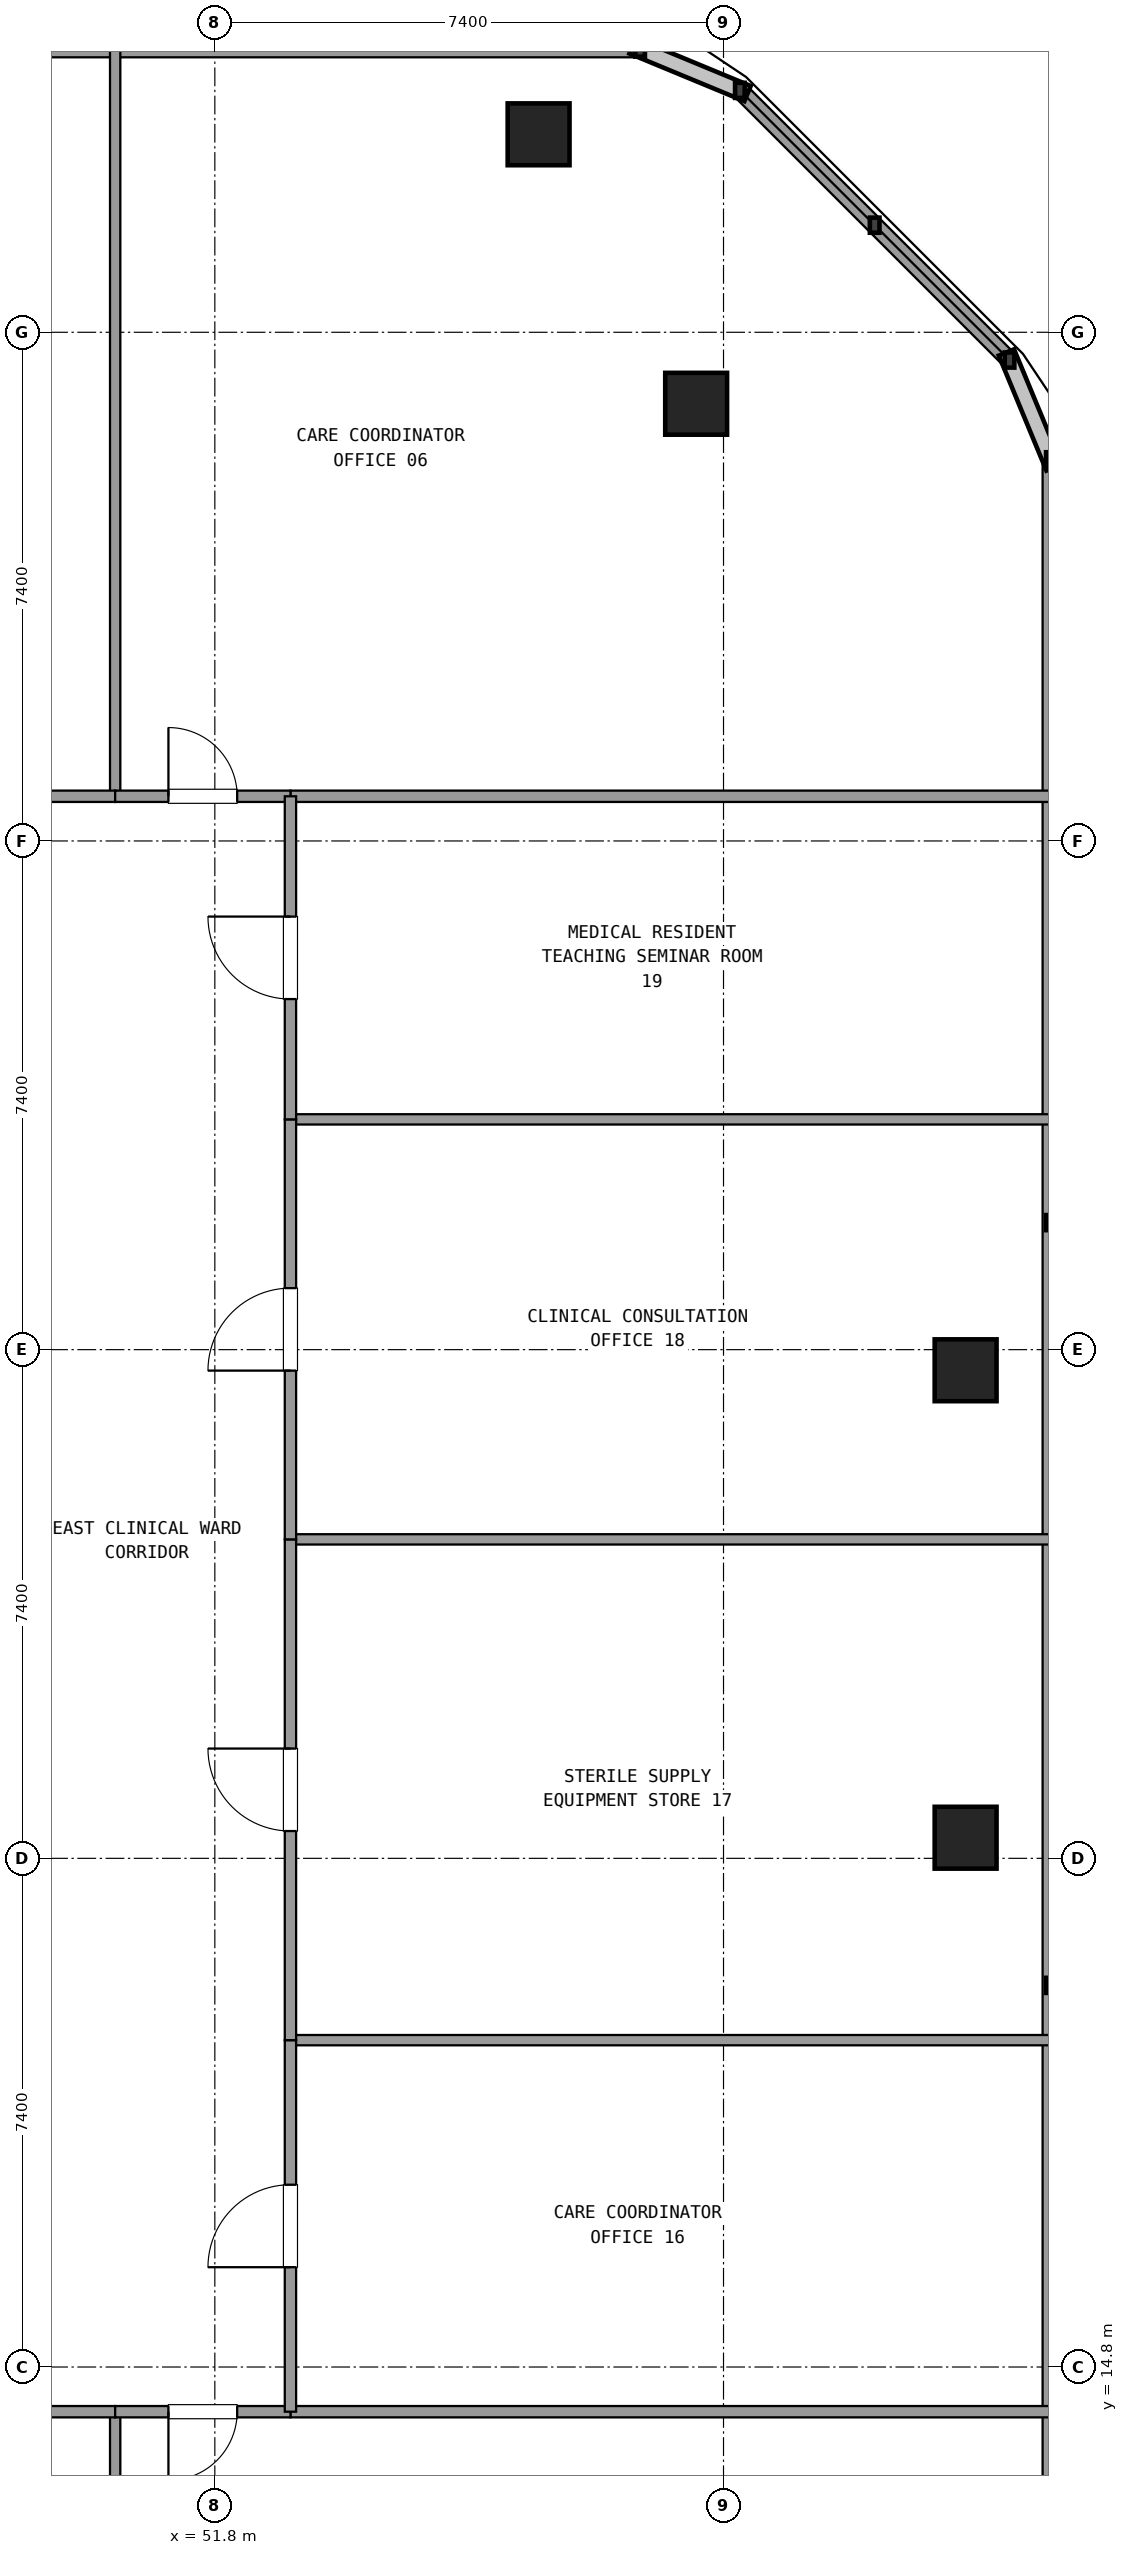
"""IFC4 building model, lengths in metres.
Left out: names, types, materials, properties, quantities, classifications, styles, units other than length and angle.
Written with IfcOpenShell. Run it as: python <this file> out.ifc"""

import sys

from ifc_helpers import new_model, si_unit, direction, frame, frame_2d, origin, origin_2d, place, context, subcontext, project, spatial, rectangle, extrude, element, fill, save


model = new_model("IFC4")
c1 = context("Model", 3, precision=1e-05, world=origin(), true_north=direction((0.0, 1.0)))
c2 = subcontext(c1, "Body", "Model", "MODEL_VIEW")
j1 = project(units=[si_unit("LENGTHUNIT", "METRE"), si_unit("PLANEANGLEUNIT", "RADIAN")], contexts=[c1])
p1 = place(None, origin())
s1 = spatial("IfcSite", under=j1, at=p1, CompositionType="ELEMENT")
p2 = place(p1, origin())
s2 = spatial("IfcBuilding", under=s1, at=p2, CompositionType="ELEMENT")
p3 = place(p2, frame((0.0, 0.0, 228.78)))
s3 = spatial("IfcBuildingStorey", under=s2, at=p3, CompositionType="ELEMENT", Elevation=228.78)
for number, where, z_axis, x_axis in (
    (1, (62.722, 22.5, 0.0), (0.0, 0.0, 1.0), (1.0, 0.0, 0.0)),
    (2, (62.722, 29.3, 0.0), (0.0, 0.0, 1.0), (1.0, 0.0, 0.0)),
    (3, (58.802, 43.36, 0.0), (0.0, 0.0, 1.0), (1.0, 0.0, 0.0)),
    (4, (56.51, 47.28, 0.0), (0.0, 0.0, 1.0), (1.0, 0.0, 0.0)),
):
    element("IfcColumn", number, at=place(p3, frame(where, z_axis=z_axis, x_axis=x_axis)), inside=s3, PredefinedType="COLUMN", context=c2, shape_type="SweptSolid", body=[
        extrude(rectangle(XDim=0.9, YDim=0.9, at=origin_2d()), origin(), (0.0, 0.0, 1.0), 3.6),
    ])
p4 = place(p3, frame((63.962, 9.255, 0.0), z_axis=(0.0, 0.0, 1.0), x_axis=(0.0, 1.0, 0.0)))
e5 = element("IfcWall", 5, at=p4, inside=s3, PredefinedType="SOLIDWALL", context=c2, shape_type="SweptSolid", body=[
    extrude(rectangle(XDim=33.29, YDim=0.24, at=frame_2d((16.645, 0.0))), origin(), (0.0, 0.0, 1.0), 0.85),
])
p5 = place(p3, frame((63.361, 43.996, 0.0), z_axis=(0.0, 0.0, 1.0), x_axis=(-0.707128783731, 0.707084777957, 0.0)))
e6 = element("IfcWall", 6, at=p5, inside=s3, PredefinedType="SOLIDWALL", context=c2, shape_type="SweptSolid", body=[
    extrude(rectangle(XDim=5.548, YDim=0.24, at=frame_2d((2.774, 0.0))), origin(), (0.0, 0.0, 1.0), 0.85),
])
p6 = place(p3, frame((57.987, 48.52, 0.0), z_axis=(0.0, 0.0, 1.0), x_axis=(-1.0, 0.0, 0.0)))
e7 = element("IfcWall", 7, at=p6, inside=s3, PredefinedType="SOLIDWALL", context=c2, shape_type="SweptSolid", body=[
    extrude(rectangle(XDim=41.974, YDim=0.24, at=frame_2d((20.987, 0.0))), origin(), (0.0, 0.0, 1.0), 0.85),
])
for number, where, z_axis, x_axis in (
    (8, (52.9, 37.65, 0.0), (0.0, 0.0, 1.0), (1.0, 0.0, 0.0)),
    (9, (52.9, 14.15, 0.0), (0.0, 0.0, 1.0), (1.0, 0.0, 0.0)),
):
    element("IfcWall", number, at=place(p3, frame(where, z_axis=z_axis, x_axis=x_axis)), inside=s3, PredefinedType="PARTITIONING", context=c2, shape_type="SweptSolid", body=[
        extrude(rectangle(XDim=11.042, YDim=0.165, at=frame_2d((5.521, 0.0))), origin(), (0.0, 0.0, 1.0), 2.59),
    ])
p7 = place(p3, frame((50.35, 37.65, 0.0), z_axis=(0.0, 0.0, 1.0), x_axis=(0.0, 1.0, 0.0)))
e10 = element("IfcWall", 10, at=p7, inside=s3, PredefinedType="PARTITIONING", context=c2, shape_type="SweptSolid", body=[
    extrude(rectangle(XDim=10.85, YDim=0.15, at=frame_2d((5.425, 0.0))), origin(), (0.0, 0.0, 1.0), 2.59),
])
p8 = place(p3, frame((43.221, 37.65, 0.0), z_axis=(0.0, 0.0, 1.0), x_axis=(1.0, 0.0, 0.0)))
e11 = element("IfcWall", 11, at=p8, inside=s3, PredefinedType="PARTITIONING", context=c2, shape_type="SweptSolid", body=[
    extrude(rectangle(XDim=7.129, YDim=0.165, at=frame_2d((3.564, 0.0))), origin(), (0.0, 0.0, 1.0), 2.59),
])
p9 = place(p8, frame((2.965, 0.0, 0.0)))
e12 = element("IfcOpeningElement", 12, at=p9, cuts=e11, PredefinedType="OPENING", context=c2, shape_type="SweptSolid", body=[
    extrude(rectangle(XDim=1.2, YDim=2.15, at=frame_2d((0.6, 1.075))), frame((0.0, 0.093, 0.0), z_axis=(0.0, -1.0, 0.0), x_axis=(1.0, 0.0, 0.0)), (0.0, 0.0, 1.0), 0.185),
])
p10 = place(p3, frame((50.35, 37.65, 0.0), z_axis=(0.0, 0.0, 1.0), x_axis=(1.0, 0.0, 0.0)))
e13 = element("IfcWall", 13, at=p10, inside=s3, PredefinedType="PARTITIONING", context=c2, shape_type="SweptSolid", body=[
    extrude(rectangle(XDim=2.55, YDim=0.165, at=frame_2d((1.275, 0.0))), origin(), (0.0, 0.0, 1.0), 2.59),
])
p11 = place(p10, frame((0.775, 0.0, 0.0)))
e14 = element("IfcOpeningElement", 14, at=p11, cuts=e13, PredefinedType="OPENING", context=c2, shape_type="SweptSolid", body=[
    extrude(rectangle(XDim=1.0, YDim=2.15, at=frame_2d((0.5, 1.075))), frame((0.0, 0.093, 0.0), z_axis=(0.0, -1.0, 0.0), x_axis=(1.0, 0.0, 0.0)), (0.0, 0.0, 1.0), 0.185),
])
p12 = place(p3, frame((50.35, 14.15, 0.0), z_axis=(0.0, 0.0, 1.0), x_axis=(0.0, -1.0, 0.0)))
e15 = element("IfcWall", 15, at=p12, inside=s3, PredefinedType="PARTITIONING", context=c2, shape_type="SweptSolid", body=[
    extrude(rectangle(XDim=10.85, YDim=0.15, at=frame_2d((5.425, 0.0))), origin(), (0.0, 0.0, 1.0), 2.59),
])
p13 = place(p3, frame((43.221, 14.15, 0.0), z_axis=(0.0, 0.0, 1.0), x_axis=(1.0, 0.0, 0.0)))
e16 = element("IfcWall", 16, at=p13, inside=s3, PredefinedType="PARTITIONING", context=c2, shape_type="SweptSolid", body=[
    extrude(rectangle(XDim=7.129, YDim=0.165, at=frame_2d((3.564, 0.0))), origin(), (0.0, 0.0, 1.0), 2.59),
])
p14 = place(p13, frame((2.965, 0.0, 0.0)))
e17 = element("IfcOpeningElement", 17, at=p14, cuts=e16, PredefinedType="OPENING", context=c2, shape_type="SweptSolid", body=[
    extrude(rectangle(XDim=1.2, YDim=2.15, at=frame_2d((0.6, 1.075))), frame((0.0, 0.093, 0.0), z_axis=(0.0, -1.0, 0.0), x_axis=(1.0, 0.0, 0.0)), (0.0, 0.0, 1.0), 0.185),
])
p15 = place(p3, frame((50.35, 14.15, 0.0), z_axis=(0.0, 0.0, 1.0), x_axis=(1.0, 0.0, 0.0)))
e18 = element("IfcWall", 18, at=p15, inside=s3, PredefinedType="PARTITIONING", context=c2, shape_type="SweptSolid", body=[
    extrude(rectangle(XDim=2.55, YDim=0.165, at=frame_2d((1.275, 0.0))), origin(), (0.0, 0.0, 1.0), 2.59),
])
p16 = place(p15, frame((0.775, 0.0, 0.0)))
e19 = element("IfcOpeningElement", 19, at=p16, cuts=e18, PredefinedType="OPENING", context=c2, shape_type="SweptSolid", body=[
    extrude(rectangle(XDim=1.0, YDim=2.15, at=frame_2d((0.5, 1.075))), frame((0.0, 0.093, 0.0), z_axis=(0.0, -1.0, 0.0), x_axis=(1.0, 0.0, 0.0)), (0.0, 0.0, 1.0), 0.185),
])
p17 = place(p3, frame((52.9, 19.555, 0.0), z_axis=(0.0, 0.0, 1.0), x_axis=(1.0, 0.0, 0.0)))
e20 = element("IfcWall", 20, at=p17, inside=s3, PredefinedType="PARTITIONING", context=c2, shape_type="SweptSolid", body=[
    extrude(rectangle(XDim=11.042, YDim=0.15, at=frame_2d((5.521, 0.0))), origin(), (0.0, 0.0, 1.0), 2.59),
])
p18 = place(p3, frame((52.9, 14.15, 0.0), z_axis=(0.0, 0.0, 1.0), x_axis=(0.0, 1.0, 0.0)))
e21 = element("IfcWall", 21, at=p18, inside=s3, PredefinedType="PARTITIONING", context=c2, shape_type="SweptSolid", body=[
    extrude(rectangle(XDim=5.405, YDim=0.165, at=frame_2d((2.703, 0.0))), origin(), (0.0, 0.0, 1.0), 2.59),
])
p19 = place(p18, frame((2.102, 0.0, 0.0)))
e22 = element("IfcOpeningElement", 22, at=p19, cuts=e21, PredefinedType="OPENING", context=c2, shape_type="SweptSolid", body=[
    extrude(rectangle(XDim=1.2, YDim=2.15, at=frame_2d((0.6, 1.075))), frame((0.0, 0.093, 0.0), z_axis=(0.0, -1.0, 0.0), x_axis=(1.0, 0.0, 0.0)), (0.0, 0.0, 1.0), 0.185),
])
p20 = place(p3, frame((52.9, 26.84, 0.0), z_axis=(0.0, 0.0, 1.0), x_axis=(1.0, 0.0, 0.0)))
e23 = element("IfcWall", 23, at=p20, inside=s3, PredefinedType="PARTITIONING", context=c2, shape_type="SweptSolid", body=[
    extrude(rectangle(XDim=11.042, YDim=0.15, at=frame_2d((5.521, 0.0))), origin(), (0.0, 0.0, 1.0), 2.59),
])
p21 = place(p3, frame((52.9, 19.555, 0.0), z_axis=(0.0, 0.0, 1.0), x_axis=(0.0, 1.0, 0.0)))
e24 = element("IfcWall", 24, at=p21, inside=s3, PredefinedType="PARTITIONING", context=c2, shape_type="SweptSolid", body=[
    extrude(rectangle(XDim=7.285, YDim=0.165, at=frame_2d((3.643, 0.0))), origin(), (0.0, 0.0, 1.0), 2.59),
])
p22 = place(p21, frame((3.042, 0.0, 0.0)))
e25 = element("IfcOpeningElement", 25, at=p22, cuts=e24, PredefinedType="OPENING", context=c2, shape_type="SweptSolid", body=[
    extrude(rectangle(XDim=1.2, YDim=2.15, at=frame_2d((0.6, 1.075))), frame((0.0, 0.093, 0.0), z_axis=(0.0, -1.0, 0.0), x_axis=(1.0, 0.0, 0.0)), (0.0, 0.0, 1.0), 0.185),
])
p23 = place(p3, frame((52.9, 32.95, 0.0), z_axis=(0.0, 0.0, 1.0), x_axis=(1.0, 0.0, 0.0)))
e26 = element("IfcWall", 26, at=p23, inside=s3, PredefinedType="PARTITIONING", context=c2, shape_type="SweptSolid", body=[
    extrude(rectangle(XDim=11.042, YDim=0.15, at=frame_2d((5.521, 0.0))), origin(), (0.0, 0.0, 1.0), 2.59),
])
p24 = place(p3, frame((52.9, 26.84, 0.0), z_axis=(0.0, 0.0, 1.0), x_axis=(0.0, 1.0, 0.0)))
e27 = element("IfcWall", 27, at=p24, inside=s3, PredefinedType="PARTITIONING", context=c2, shape_type="SweptSolid", body=[
    extrude(rectangle(XDim=6.11, YDim=0.165, at=frame_2d((3.055, 0.0))), origin(), (0.0, 0.0, 1.0), 2.59),
])
p25 = place(p24, frame((2.455, 0.0, 0.0)))
e28 = element("IfcOpeningElement", 28, at=p25, cuts=e27, PredefinedType="OPENING", context=c2, shape_type="SweptSolid", body=[
    extrude(rectangle(XDim=1.2, YDim=2.15, at=frame_2d((0.6, 1.075))), frame((0.0, 0.093, 0.0), z_axis=(0.0, -1.0, 0.0), x_axis=(1.0, 0.0, 0.0)), (0.0, 0.0, 1.0), 0.185),
])
p26 = place(p3, frame((52.9, 32.95, 0.0), z_axis=(0.0, 0.0, 1.0), x_axis=(0.0, 1.0, 0.0)))
e29 = element("IfcWall", 29, at=p26, inside=s3, PredefinedType="PARTITIONING", context=c2, shape_type="SweptSolid", body=[
    extrude(rectangle(XDim=4.7, YDim=0.165, at=frame_2d((2.35, 0.0))), origin(), (0.0, 0.0, 1.0), 2.59),
])
p27 = place(p26, frame((1.75, 0.0, 0.0)))
e30 = element("IfcOpeningElement", 30, at=p27, cuts=e29, PredefinedType="OPENING", context=c2, shape_type="SweptSolid", body=[
    extrude(rectangle(XDim=1.2, YDim=2.15, at=frame_2d((0.6, 1.075))), frame((0.0, 0.093, 0.0), z_axis=(0.0, -1.0, 0.0), x_axis=(1.0, 0.0, 0.0)), (0.0, 0.0, 1.0), 0.185),
])
p28 = place(p11, origin())
e31 = element("IfcDoor", 31, at=p28, inside=s3, OperationType="SINGLE_SWING_LEFT", PredefinedType="DOOR", context=c2, shape_type="SweptSolid", body=[
    extrude(rectangle(XDim=1.0, YDim=2.15, at=frame_2d((0.5, 1.075))), frame((0.0, 0.025, 0.0), z_axis=(0.0, -1.0, 0.0), x_axis=(1.0, 0.0, 0.0)), (0.0, 0.0, 1.0), 0.05),
])
fill(e14, e31)
p29 = place(p16, frame((1.0, 0.0, 0.0), z_axis=(0.0, 0.0, 1.0), x_axis=(-1.0, 0.0, 0.0)))
e32 = element("IfcDoor", 32, at=p29, inside=s3, OperationType="SINGLE_SWING_LEFT", PredefinedType="DOOR", context=c2, shape_type="SweptSolid", body=[
    extrude(rectangle(XDim=1.0, YDim=2.15, at=frame_2d((0.5, 1.075))), frame((0.0, 0.025, 0.0), z_axis=(0.0, -1.0, 0.0), x_axis=(1.0, 0.0, 0.0)), (0.0, 0.0, 1.0), 0.05),
])
fill(e19, e32)
p30 = place(p19, origin())
e33 = element("IfcDoor", 33, at=p30, inside=s3, OperationType="SINGLE_SWING_LEFT", PredefinedType="DOOR", context=c2, shape_type="SweptSolid", body=[
    extrude(rectangle(XDim=1.2, YDim=2.15, at=frame_2d((0.6, 1.075))), frame((0.0, 0.025, 0.0), z_axis=(0.0, -1.0, 0.0), x_axis=(1.0, 0.0, 0.0)), (0.0, 0.0, 1.0), 0.05),
])
fill(e22, e33)
p31 = place(p22, origin())
e34 = element("IfcDoor", 34, at=p31, inside=s3, OperationType="SINGLE_SWING_RIGHT", PredefinedType="DOOR", context=c2, shape_type="SweptSolid", body=[
    extrude(rectangle(XDim=1.2, YDim=2.15, at=frame_2d((0.6, 1.075))), frame((0.0, 0.025, 0.0), z_axis=(0.0, -1.0, 0.0), x_axis=(1.0, 0.0, 0.0)), (0.0, 0.0, 1.0), 0.05),
])
fill(e25, e34)
p32 = place(p25, origin())
e35 = element("IfcDoor", 35, at=p32, inside=s3, OperationType="SINGLE_SWING_LEFT", PredefinedType="DOOR", context=c2, shape_type="SweptSolid", body=[
    extrude(rectangle(XDim=1.2, YDim=2.15, at=frame_2d((0.6, 1.075))), frame((0.0, 0.025, 0.0), z_axis=(0.0, -1.0, 0.0), x_axis=(1.0, 0.0, 0.0)), (0.0, 0.0, 1.0), 0.05),
])
fill(e28, e35)
p33 = place(p27, origin())
e36 = element("IfcDoor", 36, at=p33, inside=s3, OperationType="SINGLE_SWING_RIGHT", PredefinedType="DOOR", context=c2, shape_type="SweptSolid", body=[
    extrude(rectangle(XDim=1.2, YDim=2.15, at=frame_2d((0.6, 1.075))), frame((0.0, 0.025, 0.0), z_axis=(0.0, -1.0, 0.0), x_axis=(1.0, 0.0, 0.0)), (0.0, 0.0, 1.0), 0.05),
])
fill(e30, e36)
save(model, sys.argv[1])
